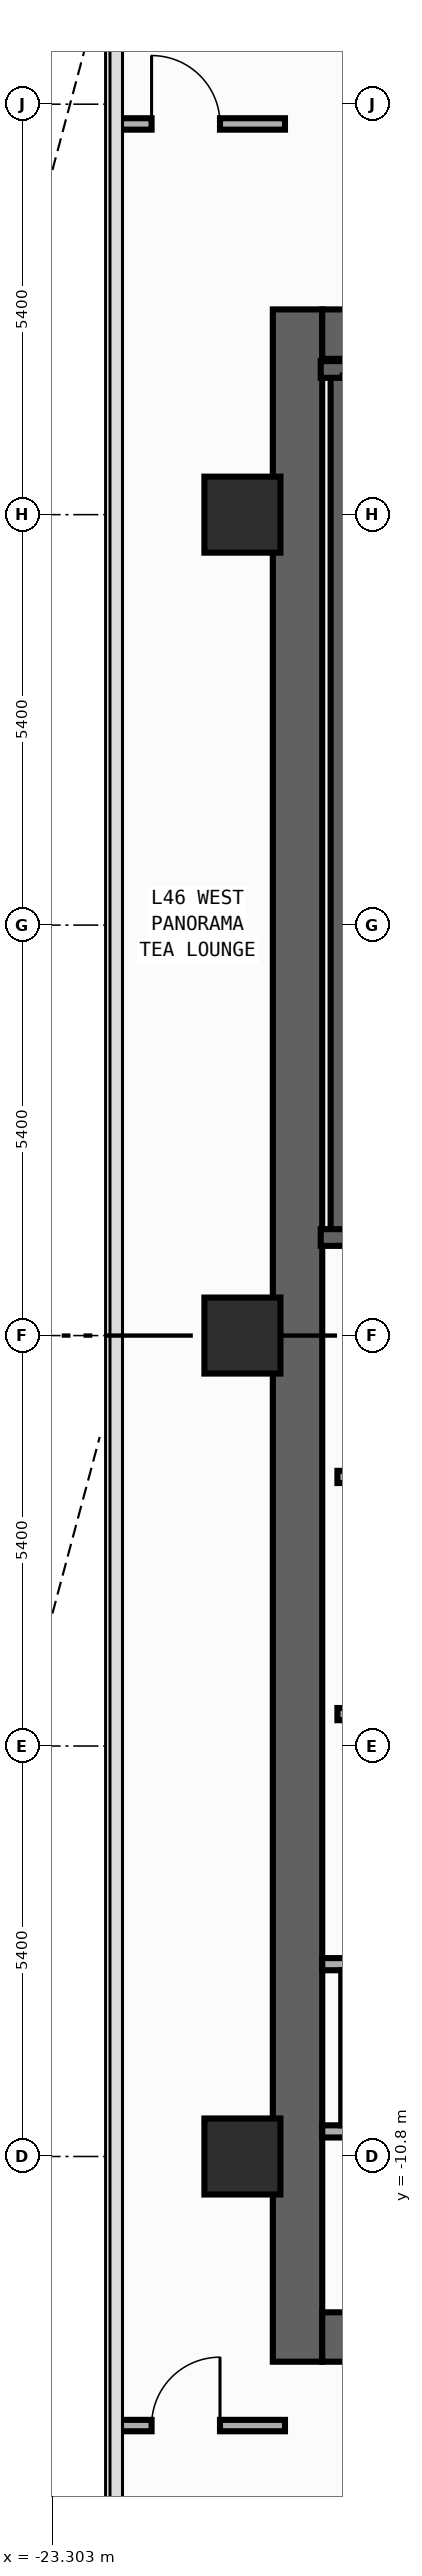
"""IFC4 building model, lengths in metres.
Left out: names, types, materials, properties, quantities, classifications, styles, units other than length and angle.
Written with IfcOpenShell. Run it as: python <this file> out.ifc"""

import sys

from ifc_helpers import new_model, si_unit, direction, frame, frame_2d, origin, origin_2d, place, context, subcontext, project, spatial, rectangle, extrude, element, fill, save


model = new_model("IFC4")
c1 = context("Model", 3, precision=1e-05, world=origin(), true_north=direction((0.0, 1.0)))
c2 = subcontext(c1, "Body", "Model", "MODEL_VIEW")
j1 = project(units=[si_unit("LENGTHUNIT", "METRE"), si_unit("PLANEANGLEUNIT", "RADIAN")], contexts=[c1])
p1 = place(None, origin())
s1 = spatial("IfcSite", under=j1, at=p1, CompositionType="ELEMENT")
p2 = place(p1, origin())
s2 = spatial("IfcBuilding", under=s1, at=p2, CompositionType="ELEMENT")
p3 = place(p2, frame((0.0, 0.0, 199.2)))
s3 = spatial("IfcBuildingStorey", under=s2, at=p3, CompositionType="ELEMENT", Elevation=199.2)
p4 = place(p3, frame((-20.075, -13.5, 0.0), z_axis=(0.0, 0.0, 1.0), x_axis=(0.0, 1.0, 0.0)))
e1 = element("IfcWall", 1, at=p4, inside=s3, PredefinedType="SHEAR", context=c2, shape_type="SweptSolid", body=[
    extrude(rectangle(XDim=27.0, YDim=0.65, at=frame_2d((13.5, 0.0))), origin(), (0.0, 0.0, 1.0), 3.54),
])
for number, where, z_axis, x_axis in (
    (2, (-19.75, -13.175, 0.0), (0.0, 0.0, 1.0), (1.0, 0.0, 0.0)),
    (3, (-19.75, 13.175, 0.0), (0.0, 0.0, 1.0), (1.0, 0.0, 0.0)),
):
    element("IfcWall", number, at=place(p3, frame(where, z_axis=z_axis, x_axis=x_axis)), inside=s3, PredefinedType="SHEAR", context=c2, shape_type="SweptSolid", body=[
        extrude(rectangle(XDim=7.1, YDim=0.65, at=frame_2d((3.55, 0.0))), origin(), (0.0, 0.0, 1.0), 3.54),
    ])
p5 = place(p3, frame((-19.53, 1.29, 0.0), z_axis=(0.0, 0.0, 1.0), x_axis=(0.0, 1.0, 0.0)))
e4 = element("IfcWall", 4, at=p5, inside=s3, PredefinedType="SHEAR", context=c2, shape_type="SweptSolid", body=[
    extrude(rectangle(XDim=11.42, YDim=0.22, at=frame_2d((5.71, 0.0))), origin(), (0.0, 0.0, 1.0), 3.54),
])
p6 = place(p3, frame((-19.77, 12.71, 0.0), z_axis=(0.0, 0.0, 1.0), x_axis=(1.0, 0.0, 0.0)))
e5 = element("IfcWall", 5, at=p6, inside=s3, PredefinedType="SHEAR", context=c2, shape_type="SweptSolid", body=[
    extrude(rectangle(XDim=4.065, YDim=0.22, at=frame_2d((2.032, 0.0))), origin(), (0.0, 0.0, 1.0), 3.54),
])
p7 = place(p3, frame((-19.77, 1.29, 0.0), z_axis=(0.0, 0.0, 1.0), x_axis=(1.0, 0.0, 0.0)))
e6 = element("IfcWall", 6, at=p7, inside=s3, PredefinedType="SHEAR", context=c2, shape_type="SweptSolid", body=[
    extrude(rectangle(XDim=4.065, YDim=0.22, at=frame_2d((2.032, 0.0))), origin(), (0.0, 0.0, 1.0), 3.54),
])
p8 = place(p7, frame((1.08, 0.0, 0.0)))
e7 = element("IfcOpeningElement", 7, at=p8, cuts=e6, PredefinedType="OPENING", context=c2, shape_type="SweptSolid", body=[
    extrude(rectangle(XDim=1.1, YDim=2.2, at=frame_2d((0.55, 1.1))), frame((0.0, 0.12, 0.0), z_axis=(0.0, -1.0, 0.0), x_axis=(1.0, 0.0, 0.0)), (0.0, 0.0, 1.0), 0.24),
])
for number, where, z_axis, x_axis in (
    (8, (-20.8, -10.8, 0.0), (0.0, 0.0, 1.0), (1.0, 0.0, 0.0)),
    (9, (-20.8, 0.0, 0.0), (0.0, 0.0, 1.0), (1.0, 0.0, 0.0)),
    (10, (-20.8, 10.8, 0.0), (0.0, 0.0, 1.0), (1.0, 0.0, 0.0)),
):
    element("IfcColumn", number, at=place(p3, frame(where, z_axis=z_axis, x_axis=x_axis)), inside=s3, PredefinedType="COLUMN", context=c2, shape_type="SweptSolid", body=[
        extrude(rectangle(XDim=1.0, YDim=1.0, at=origin_2d()), origin(), (0.0, 0.0, 1.0), 3.8),
    ])
p9 = place(p3, frame((-19.55, -1.86, 0.0), z_axis=(0.0, 0.0, 1.0), x_axis=(1.0, 0.0, 0.0)))
e11 = element("IfcWall", 11, at=p9, inside=s3, PredefinedType="STANDARD", context=c2, shape_type="SweptSolid", body=[
    extrude(rectangle(XDim=3.8, YDim=0.16, at=frame_2d((1.9, 0.0))), origin(), (0.0, 0.0, 1.0), 3.54),
])
p10 = place(p9, frame((1.18, 0.0, 0.0)))
e12 = element("IfcOpeningElement", 12, at=p10, cuts=e11, PredefinedType="OPENING", context=c2, shape_type="SweptSolid", body=[
    extrude(rectangle(XDim=1.15, YDim=2.2, at=frame_2d((0.575, 1.1))), frame((0.0, 0.09, 0.0), z_axis=(0.0, -1.0, 0.0), x_axis=(1.0, 0.0, 0.0)), (0.0, 0.0, 1.0), 0.18),
])
p11 = place(p3, frame((-19.55, -4.98, 0.0), z_axis=(0.0, 0.0, 1.0), x_axis=(1.0, 0.0, 0.0)))
e13 = element("IfcWall", 13, at=p11, inside=s3, PredefinedType="STANDARD", context=c2, shape_type="SweptSolid", body=[
    extrude(rectangle(XDim=3.8, YDim=0.16, at=frame_2d((1.9, 0.0))), origin(), (0.0, 0.0, 1.0), 3.54),
])
for number, where, z_axis, x_axis in (
    (14, (-19.75, -10.47, 0.0), (0.0, 0.0, 1.0), (1.0, 0.0, 0.0)),
    (15, (-19.75, -8.27, 0.0), (0.0, 0.0, 1.0), (1.0, 0.0, 0.0)),
):
    element("IfcWall", number, at=place(p3, frame(where, z_axis=z_axis, x_axis=x_axis)), inside=s3, PredefinedType="PARTITIONING", context=c2, shape_type="SweptSolid", body=[
        extrude(rectangle(XDim=2.44, YDim=0.16, at=frame_2d((1.22, 0.0))), origin(), (0.0, 0.0, 1.0), 3.54),
    ])
p12 = place(p3, frame((-22.455, 15.94, 0.0), z_axis=(0.0, 0.0, 1.0), x_axis=(1.0, 0.0, 0.0)))
e16 = element("IfcWall", 16, at=p12, inside=s3, PredefinedType="PARTITIONING", context=c2, shape_type="SweptSolid", body=[
    extrude(rectangle(XDim=2.215, YDim=0.15, at=frame_2d((1.107, 0.0))), origin(), (0.0, 0.0, 1.0), 3.54),
])
p13 = place(p12, frame((0.46, 0.0, 0.0)))
e17 = element("IfcOpeningElement", 17, at=p13, cuts=e16, PredefinedType="OPENING", context=c2, shape_type="SweptSolid", body=[
    extrude(rectangle(XDim=0.9, YDim=2.15, at=frame_2d((0.45, 1.075))), frame((0.0, 0.085, 0.0), z_axis=(0.0, -1.0, 0.0), x_axis=(1.0, 0.0, 0.0)), (0.0, 0.0, 1.0), 0.17),
])
p14 = place(p3, frame((-22.455, -14.34, 0.0), z_axis=(0.0, 0.0, 1.0), x_axis=(1.0, 0.0, 0.0)))
e18 = element("IfcWall", 18, at=p14, inside=s3, PredefinedType="PARTITIONING", context=c2, shape_type="SweptSolid", body=[
    extrude(rectangle(XDim=2.215, YDim=0.15, at=frame_2d((1.107, 0.0))), origin(), (0.0, 0.0, 1.0), 3.54),
])
p15 = place(p14, frame((0.46, 0.0, 0.0)))
e19 = element("IfcOpeningElement", 19, at=p15, cuts=e18, PredefinedType="OPENING", context=c2, shape_type="SweptSolid", body=[
    extrude(rectangle(XDim=0.9, YDim=2.15, at=frame_2d((0.45, 1.075))), frame((0.0, 0.085, 0.0), z_axis=(0.0, -1.0, 0.0), x_axis=(1.0, 0.0, 0.0)), (0.0, 0.0, 1.0), 0.17),
])
p16 = place(p3, frame((-19.45, -10.39, 0.0), z_axis=(0.0, 0.0, 1.0), x_axis=(0.0, 1.0, 0.0)))
e20 = element("IfcWall", 20, at=p16, inside=s3, PredefinedType="PARTITIONING", context=c2, shape_type="SweptSolid", body=[
    extrude(rectangle(XDim=2.04, YDim=0.1, at=frame_2d((1.02, 0.0))), origin(), (0.0, 0.0, 1.0), 3.54),
])
p17 = place(p13, origin())
e21 = element("IfcDoor", 21, at=p17, inside=s3, OperationType="SINGLE_SWING_LEFT", PredefinedType="DOOR", context=c2, shape_type="SweptSolid", body=[
    extrude(rectangle(XDim=0.9, YDim=2.15, at=frame_2d((0.45, 1.075))), frame((0.0, 0.025, 0.0), z_axis=(0.0, -1.0, 0.0), x_axis=(1.0, 0.0, 0.0)), (0.0, 0.0, 1.0), 0.05),
])
fill(e17, e21)
p18 = place(p15, origin())
e22 = element("IfcDoor", 22, at=p18, inside=s3, OperationType="SINGLE_SWING_RIGHT", PredefinedType="DOOR", context=c2, shape_type="SweptSolid", body=[
    extrude(rectangle(XDim=0.9, YDim=2.15, at=frame_2d((0.45, 1.075))), frame((0.0, 0.025, 0.0), z_axis=(0.0, -1.0, 0.0), x_axis=(1.0, 0.0, 0.0)), (0.0, 0.0, 1.0), 0.05),
])
fill(e19, e22)
save(model, sys.argv[1])
